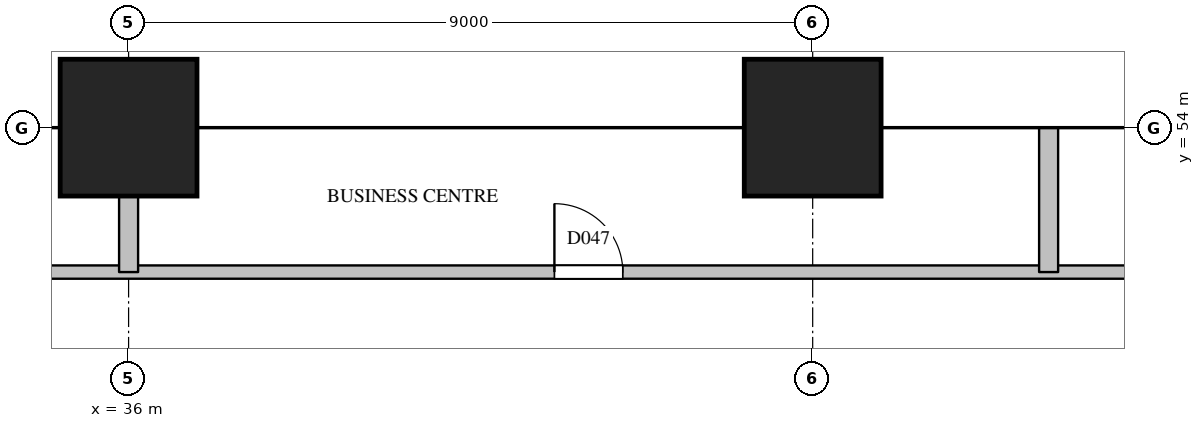
"""IFC4 building model, lengths in metres.
Left out: names, types, materials, properties, quantities, classifications, styles, units other than length and angle.
Written with IfcOpenShell. Run it as: python <this file> out.ifc"""

import sys

from ifc_helpers import new_model, si_unit, direction, frame, frame_2d, origin, origin_2d, place, context, subcontext, project, spatial, rectangle, extrude, element, fill, save


model = new_model("IFC4")
c1 = context("Model", 3, precision=1e-05, world=origin(), true_north=direction((0.0, 1.0)))
c2 = subcontext(c1, "Body", "Model", "MODEL_VIEW")
j1 = project(units=[si_unit("LENGTHUNIT", "METRE"), si_unit("PLANEANGLEUNIT", "RADIAN")], contexts=[c1])
p1 = place(None, origin())
s1 = spatial("IfcSite", under=j1, at=p1, CompositionType="ELEMENT")
p2 = place(p1, origin())
s2 = spatial("IfcBuilding", under=s1, at=p2, CompositionType="ELEMENT")
p3 = place(p2, frame((0.0, 0.0, 69.0)))
s3 = spatial("IfcBuildingStorey", under=s2, at=p3, CompositionType="ELEMENT", Elevation=69.0)
for number, where, z_axis, x_axis in (
    (1, (36.0, 54.0, 0.0), (0.0, 0.0, 1.0), (1.0, 0.0, 0.0)),
    (2, (45.0, 54.0, 0.0), (0.0, 0.0, 1.0), (1.0, 0.0, 0.0)),
):
    element("IfcColumn", number, at=place(p3, frame(where, z_axis=z_axis, x_axis=x_axis)), inside=s3, PredefinedType="COLUMN", context=c2, shape_type="SweptSolid", body=[
        extrude(rectangle(XDim=1.8, YDim=1.8, at=origin_2d()), origin(), (0.0, 0.0, 1.0), 3.8),
    ])
p4 = place(p3, frame((33.9, 52.1, 0.0), z_axis=(0.0, 0.0, 1.0), x_axis=(1.0, 0.0, 0.0)))
e3 = element("IfcWall", 3, at=p4, inside=s3, PredefinedType="PARTITIONING", context=c2, shape_type="SweptSolid", body=[
    extrude(rectangle(XDim=16.6, YDim=0.175, at=frame_2d((8.3, 0.0))), origin(), (0.0, 0.0, 1.0), 3.5),
])
p5 = place(p4, frame((7.702, 0.0, 0.0)))
e4 = element("IfcOpeningElement", 4, at=p5, cuts=e3, PredefinedType="OPENING", context=c2, shape_type="SweptSolid", body=[
    extrude(rectangle(XDim=0.9, YDim=2.1, at=frame_2d((0.45, 1.05))), frame((0.0, 0.097, 0.0), z_axis=(0.0, -1.0, 0.0), x_axis=(1.0, 0.0, 0.0)), (0.0, 0.0, 1.0), 0.195),
])
p6 = place(p3, frame((36.0, 52.1, 0.0), z_axis=(0.0, 0.0, 1.0), x_axis=(0.0, 1.0, 0.0)))
e5 = element("IfcWall", 5, at=p6, inside=s3, PredefinedType="PARTITIONING", context=c2, shape_type="SweptSolid", body=[
    extrude(rectangle(XDim=1.9, YDim=0.25, at=frame_2d((0.95, 0.0))), origin(), (0.0, 0.0, 1.0), 3.5),
])
p7 = place(p3, frame((48.104, 52.1, 0.0), z_axis=(0.0, 0.0, 1.0), x_axis=(0.0, 1.0, 0.0)))
e6 = element("IfcWall", 6, at=p7, inside=s3, PredefinedType="PARTITIONING", context=c2, shape_type="SweptSolid", body=[
    extrude(rectangle(XDim=1.9, YDim=0.25, at=frame_2d((0.95, 0.0))), origin(), (0.0, 0.0, 1.0), 2.5),
])
p8 = place(p5, origin())
e7 = element("IfcDoor", 7, at=p8, inside=s3, OperationType="SINGLE_SWING_LEFT", PredefinedType="DOOR", context=c2, shape_type="SweptSolid", body=[
    extrude(rectangle(XDim=0.9, YDim=2.1, at=frame_2d((0.45, 1.05))), frame((0.0, 0.025, 0.0), z_axis=(0.0, -1.0, 0.0), x_axis=(1.0, 0.0, 0.0)), (0.0, 0.0, 1.0), 0.05),
])
fill(e4, e7)
save(model, sys.argv[1])
